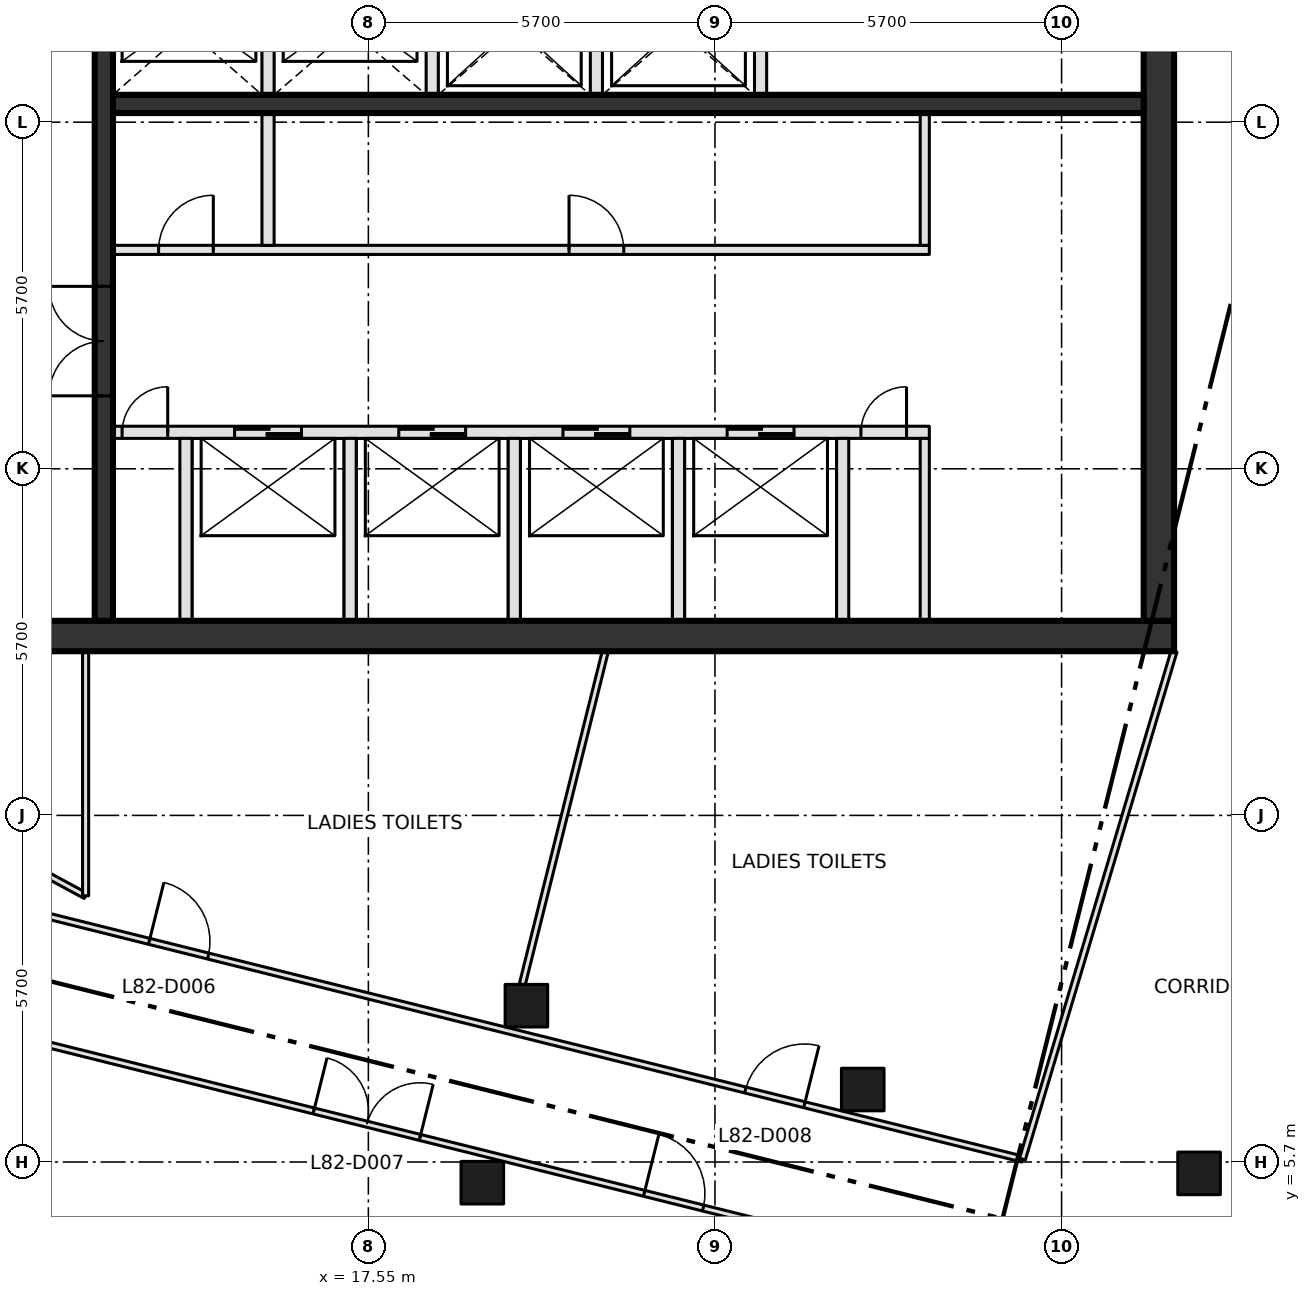
"""IFC4 building model, lengths in metres.
Left out: names, types, materials, properties, quantities, classifications, styles, units other than length and angle.
Written with IfcOpenShell. Run it as: python <this file> out.ifc"""

import sys

from ifc_helpers import new_model, si_unit, direction, frame, frame_2d, origin, origin_2d, place, context, subcontext, project, spatial, rectangle, extrude, element, fill, save


model = new_model("IFC4")
c1 = context("Model", 3, precision=1e-05, world=origin(), true_north=direction((0.0, 1.0)))
c2 = subcontext(c1, "Body", "Model", "MODEL_VIEW")
j1 = project(units=[si_unit("LENGTHUNIT", "METRE"), si_unit("PLANEANGLEUNIT", "RADIAN")], contexts=[c1])
p1 = place(None, origin())
s1 = spatial("IfcSite", under=j1, at=p1, CompositionType="ELEMENT")
p2 = place(p1, origin())
s2 = spatial("IfcBuilding", under=s1, at=p2, CompositionType="ELEMENT")
p3 = place(p2, frame((0.0, 0.0, 358.2)))
s3 = spatial("IfcBuildingStorey", under=s2, at=p3, CompositionType="ELEMENT", Elevation=358.2)
for number, where, z_axis, x_axis in (
    (1, (19.424, 5.36, 0.0), (0.0, 0.0, 1.0), (1.0, 0.0, 0.0)),
    (2, (20.149, 8.271, 0.0), (0.0, 0.0, 1.0), (1.0, 0.0, 0.0)),
    (3, (25.68, 6.892, 0.0), (0.0, 0.0, 1.0), (1.0, 0.0, 0.0)),
    (4, (31.211, 5.513, 0.0), (0.0, 0.0, 1.0), (1.0, 0.0, 0.0)),
):
    element("IfcColumn", number, at=place(p3, frame(where, z_axis=z_axis, x_axis=x_axis)), inside=s3, PredefinedType="COLUMN", context=c2, shape_type="SweptSolid", body=[
        extrude(rectangle(XDim=0.7, YDim=0.7, at=origin_2d()), origin(), (0.0, 0.0, 1.0), 4.2),
    ])
p4 = place(p3, frame((8.0, 14.35, -0.3), z_axis=(0.0, 0.0, 1.0), x_axis=(1.0, 0.0, 0.0)))
e5 = element("IfcWall", 5, at=p4, inside=s3, PredefinedType="SHEAR", context=c2, shape_type="SweptSolid", body=[
    extrude(rectangle(XDim=22.8, YDim=0.5, at=frame_2d((11.4, 0.0))), origin(), (0.0, 0.0, 1.0), 4.2),
])
p5 = place(p4, frame((2.3, 0.0, 0.3)))
e6 = element("IfcOpeningElement", 6, at=p5, cuts=e5, PredefinedType="OPENING", context=c2, shape_type="SweptSolid", body=[
    extrude(rectangle(XDim=1.8, YDim=2.1, at=frame_2d((0.9, 1.05))), frame((0.0, 0.26, 0.0), z_axis=(0.0, -1.0, 0.0), x_axis=(1.0, 0.0, 0.0)), (0.0, 0.0, 1.0), 0.52),
])
p6 = place(p3, frame((30.55, 14.6, -0.3), z_axis=(0.0, 0.0, 1.0), x_axis=(0.0, 1.0, 0.0)))
e7 = element("IfcWall", 7, at=p6, inside=s3, PredefinedType="SHEAR", context=c2, shape_type="SweptSolid", body=[
    extrude(rectangle(XDim=21.1, YDim=0.5, at=frame_2d((10.55, 0.0))), origin(), (0.0, 0.0, 1.0), 4.2),
])
p7 = place(p3, frame((13.35, 17.7, 0.0), z_axis=(0.0, 0.0, 1.0), x_axis=(1.0, 0.0, 0.0)))
e8 = element("IfcWall", 8, at=p7, inside=s3, PredefinedType="SOLIDWALL", context=c2, shape_type="SweptSolid", body=[
    extrude(rectangle(XDim=13.425, YDim=0.2, at=frame_2d((6.712, 0.0))), origin(), (0.0, 0.0, 1.0), 3.9),
])
p8 = place(p7, frame((2.0, 0.0, 0.0)))
e9 = element("IfcOpeningElement", 9, at=p8, cuts=e8, PredefinedType="OPENING", context=c2, shape_type="SweptSolid", body=[
    extrude(rectangle(XDim=1.1, YDim=2.1, at=frame_2d((0.55, 1.05))), frame((0.0, 0.11, 0.0), z_axis=(0.0, -1.0, 0.0), x_axis=(1.0, 0.0, 0.0)), (0.0, 0.0, 1.0), 0.22),
])
p9 = place(p7, frame((4.7, 0.0, 0.0)))
e10 = element("IfcOpeningElement", 10, at=p9, cuts=e8, PredefinedType="OPENING", context=c2, shape_type="SweptSolid", body=[
    extrude(rectangle(XDim=1.1, YDim=2.1, at=frame_2d((0.55, 1.05))), frame((0.0, 0.11, 0.0), z_axis=(0.0, -1.0, 0.0), x_axis=(1.0, 0.0, 0.0)), (0.0, 0.0, 1.0), 0.22),
])
p10 = place(p7, frame((7.4, 0.0, 0.0)))
e11 = element("IfcOpeningElement", 11, at=p10, cuts=e8, PredefinedType="OPENING", context=c2, shape_type="SweptSolid", body=[
    extrude(rectangle(XDim=1.1, YDim=2.1, at=frame_2d((0.55, 1.05))), frame((0.0, 0.11, 0.0), z_axis=(0.0, -1.0, 0.0), x_axis=(1.0, 0.0, 0.0)), (0.0, 0.0, 1.0), 0.22),
])
p11 = place(p7, frame((10.1, 0.0, 0.0)))
e12 = element("IfcOpeningElement", 12, at=p11, cuts=e8, PredefinedType="OPENING", context=c2, shape_type="SweptSolid", body=[
    extrude(rectangle(XDim=1.1, YDim=2.1, at=frame_2d((0.55, 1.05))), frame((0.0, 0.11, 0.0), z_axis=(0.0, -1.0, 0.0), x_axis=(1.0, 0.0, 0.0)), (0.0, 0.0, 1.0), 0.22),
])
p12 = place(p7, frame((0.15, 0.0, 0.0)))
e13 = element("IfcOpeningElement", 13, at=p12, cuts=e8, PredefinedType="OPENING", context=c2, shape_type="SweptSolid", body=[
    extrude(rectangle(XDim=0.75, YDim=2.1, at=frame_2d((0.375, 1.05))), frame((0.0, 0.11, 0.0), z_axis=(0.0, -1.0, 0.0), x_axis=(1.0, 0.0, 0.0)), (0.0, 0.0, 1.0), 0.22),
])
p13 = place(p7, frame((12.3, 0.0, 0.0)))
e14 = element("IfcOpeningElement", 14, at=p13, cuts=e8, PredefinedType="OPENING", context=c2, shape_type="SweptSolid", body=[
    extrude(rectangle(XDim=0.75, YDim=2.1, at=frame_2d((0.375, 1.05))), frame((0.0, 0.11, 0.0), z_axis=(0.0, -1.0, 0.0), x_axis=(1.0, 0.0, 0.0)), (0.0, 0.0, 1.0), 0.22),
])
p14 = place(p3, frame((13.35, 20.7, 0.0), z_axis=(0.0, 0.0, 1.0), x_axis=(1.0, 0.0, 0.0)))
e15 = element("IfcWall", 15, at=p14, inside=s3, PredefinedType="PARTITIONING", context=c2, shape_type="SweptSolid", body=[
    extrude(rectangle(XDim=13.425, YDim=0.15, at=frame_2d((6.712, 0.0))), origin(), (0.0, 0.0, 1.0), 3.9),
])
p15 = place(p14, frame((0.75, 0.0, 0.0)))
e16 = element("IfcOpeningElement", 16, at=p15, cuts=e15, PredefinedType="OPENING", context=c2, shape_type="SweptSolid", body=[
    extrude(rectangle(XDim=0.9, YDim=2.1, at=frame_2d((0.45, 1.05))), frame((0.0, 0.085, 0.0), z_axis=(0.0, -1.0, 0.0), x_axis=(1.0, 0.0, 0.0)), (0.0, 0.0, 1.0), 0.17),
])
p16 = place(p14, frame((7.5, 0.0, 0.0)))
e17 = element("IfcOpeningElement", 17, at=p16, cuts=e15, PredefinedType="OPENING", context=c2, shape_type="SweptSolid", body=[
    extrude(rectangle(XDim=0.9, YDim=2.1, at=frame_2d((0.45, 1.05))), frame((0.0, 0.085, 0.0), z_axis=(0.0, -1.0, 0.0), x_axis=(1.0, 0.0, 0.0)), (0.0, 0.0, 1.0), 0.17),
])
p17 = place(p3, frame((13.35, 23.1, 0.0), z_axis=(0.0, 0.0, 1.0), x_axis=(1.0, 0.0, 0.0)))
e18 = element("IfcWall", 18, at=p17, inside=s3, PredefinedType="SHEAR", context=c2, shape_type="SweptSolid", body=[
    extrude(rectangle(XDim=16.95, YDim=0.3, at=frame_2d((8.475, 0.0))), origin(), (0.0, 0.0, 1.0), 3.9),
])
p18 = place(p3, frame((13.2, 14.6, 0.0), z_axis=(0.0, 0.0, 1.0), x_axis=(0.0, 1.0, 0.0)))
e19 = element("IfcWall", 19, at=p18, inside=s3, PredefinedType="SHEAR", context=c2, shape_type="SweptSolid", body=[
    extrude(rectangle(XDim=21.1, YDim=0.3, at=frame_2d((10.55, 0.0))), origin(), (0.0, 0.0, 1.0), 3.9),
])
p19 = place(p18, frame((3.7, 0.0, 0.0)))
e20 = element("IfcOpeningElement", 20, at=p19, cuts=e19, PredefinedType="OPENING", context=c2, shape_type="SweptSolid", body=[
    extrude(rectangle(XDim=1.8, YDim=2.1, at=frame_2d((0.9, 1.05))), frame((0.0, 0.16, 0.0), z_axis=(0.0, -1.0, 0.0), x_axis=(1.0, 0.0, 0.0)), (0.0, 0.0, 1.0), 0.32),
])
p20 = place(p18, frame((11.8, 0.0, 0.0)))
e21 = element("IfcOpeningElement", 21, at=p20, cuts=e19, PredefinedType="OPENING", context=c2, shape_type="SweptSolid", body=[
    extrude(rectangle(XDim=1.2, YDim=2.1, at=frame_2d((0.6, 1.05))), frame((0.0, 0.16, 0.0), z_axis=(0.0, -1.0, 0.0), x_axis=(1.0, 0.0, 0.0)), (0.0, 0.0, 1.0), 0.32),
])
p21 = place(p3, frame((14.55, 14.6, 0.0), z_axis=(0.0, 0.0, 1.0), x_axis=(0.0, 1.0, 0.0)))
e22 = element("IfcWall", 22, at=p21, inside=s3, PredefinedType="SOLIDWALL", context=c2, shape_type="SweptSolid", body=[
    extrude(rectangle(XDim=3.0, YDim=0.2, at=frame_2d((1.5, 0.0))), origin(), (0.0, 0.0, 1.0), 3.9),
])
p22 = place(p3, frame((15.9, 20.775, 0.0), z_axis=(0.0, 0.0, 1.0), x_axis=(0.0, 1.0, 0.0)))
e23 = element("IfcWall", 23, at=p22, inside=s3, PredefinedType="SOLIDWALL", context=c2, shape_type="SweptSolid", body=[
    extrude(rectangle(XDim=4.625, YDim=0.2, at=frame_2d((2.312, 0.0))), origin(), (0.0, 0.0, 1.0), 3.9),
])
p23 = place(p3, frame((17.25, 14.6, 0.0), z_axis=(0.0, 0.0, 1.0), x_axis=(0.0, 1.0, 0.0)))
e24 = element("IfcWall", 24, at=p23, inside=s3, PredefinedType="SOLIDWALL", context=c2, shape_type="SweptSolid", body=[
    extrude(rectangle(XDim=3.0, YDim=0.2, at=frame_2d((1.5, 0.0))), origin(), (0.0, 0.0, 1.0), 3.9),
])
p24 = place(p3, frame((18.6, 23.25, 0.0), z_axis=(0.0, 0.0, 1.0), x_axis=(0.0, 1.0, 0.0)))
e25 = element("IfcWall", 25, at=p24, inside=s3, PredefinedType="SOLIDWALL", context=c2, shape_type="SweptSolid", body=[
    extrude(rectangle(XDim=5.15, YDim=0.2, at=frame_2d((2.575, 0.0))), origin(), (0.0, 0.0, 1.0), 3.9),
])
p25 = place(p24, frame((3.15, 0.0, 0.0)))
e26 = element("IfcOpeningElement", 26, at=p25, cuts=e25, PredefinedType="OPENING", context=c2, shape_type="SweptSolid", body=[
    extrude(rectangle(XDim=1.2, YDim=2.1, at=frame_2d((0.6, 1.05))), frame((0.0, 0.11, 0.0), z_axis=(0.0, -1.0, 0.0), x_axis=(1.0, 0.0, 0.0)), (0.0, 0.0, 1.0), 0.22),
])
p26 = place(p3, frame((19.95, 14.6, 0.0), z_axis=(0.0, 0.0, 1.0), x_axis=(0.0, 1.0, 0.0)))
e27 = element("IfcWall", 27, at=p26, inside=s3, PredefinedType="SOLIDWALL", context=c2, shape_type="SweptSolid", body=[
    extrude(rectangle(XDim=3.0, YDim=0.2, at=frame_2d((1.5, 0.0))), origin(), (0.0, 0.0, 1.0), 3.9),
])
p27 = place(p3, frame((21.3, 23.25, 0.0), z_axis=(0.0, 0.0, 1.0), x_axis=(0.0, 1.0, 0.0)))
e28 = element("IfcWall", 28, at=p27, inside=s3, PredefinedType="SOLIDWALL", context=c2, shape_type="SweptSolid", body=[
    extrude(rectangle(XDim=2.15, YDim=0.2, at=frame_2d((1.075, 0.0))), origin(), (0.0, 0.0, 1.0), 3.9),
])
p28 = place(p3, frame((22.65, 14.6, 0.0), z_axis=(0.0, 0.0, 1.0), x_axis=(0.0, 1.0, 0.0)))
e29 = element("IfcWall", 29, at=p28, inside=s3, PredefinedType="SOLIDWALL", context=c2, shape_type="SweptSolid", body=[
    extrude(rectangle(XDim=3.0, YDim=0.2, at=frame_2d((1.5, 0.0))), origin(), (0.0, 0.0, 1.0), 3.9),
])
p29 = place(p3, frame((24.0, 23.25, 0.0), z_axis=(0.0, 0.0, 1.0), x_axis=(0.0, 1.0, 0.0)))
e30 = element("IfcWall", 30, at=p29, inside=s3, PredefinedType="SOLIDWALL", context=c2, shape_type="SweptSolid", body=[
    extrude(rectangle(XDim=2.15, YDim=0.2, at=frame_2d((1.075, 0.0))), origin(), (0.0, 0.0, 1.0), 3.9),
])
p30 = place(p3, frame((25.35, 14.6, 0.0), z_axis=(0.0, 0.0, 1.0), x_axis=(0.0, 1.0, 0.0)))
e31 = element("IfcWall", 31, at=p30, inside=s3, PredefinedType="SOLIDWALL", context=c2, shape_type="SweptSolid", body=[
    extrude(rectangle(XDim=3.0, YDim=0.2, at=frame_2d((1.5, 0.0))), origin(), (0.0, 0.0, 1.0), 3.9),
])
p31 = place(p3, frame((26.7, 14.6, 0.0), z_axis=(0.0, 0.0, 1.0), x_axis=(0.0, 1.0, 0.0)))
e32 = element("IfcWall", 32, at=p31, inside=s3, PredefinedType="PARTITIONING", context=c2, shape_type="SweptSolid", body=[
    extrude(rectangle(XDim=3.0, YDim=0.15, at=frame_2d((1.5, 0.0))), origin(), (0.0, 0.0, 1.0), 3.9),
])
p32 = place(p3, frame((26.7, 20.775, 0.0), z_axis=(0.0, 0.0, 1.0), x_axis=(0.0, 1.0, 0.0)))
e33 = element("IfcWall", 33, at=p32, inside=s3, PredefinedType="PARTITIONING", context=c2, shape_type="SweptSolid", body=[
    extrude(rectangle(XDim=2.175, YDim=0.15, at=frame_2d((1.087, 0.0))), origin(), (0.0, 0.0, 1.0), 3.9),
])
p33 = place(p3, frame((8.521, 8.567, 0.0), z_axis=(0.0, 0.0, 1.0), x_axis=(0.970303035129, -0.241892579506, 0.0)))
e34 = element("IfcWall", 34, at=p33, inside=s3, PredefinedType="PARTITIONING", context=c2, shape_type="SweptSolid", body=[
    extrude(rectangle(XDim=28.5, YDim=0.1, at=frame_2d((14.25, 0.0))), origin(), (0.0, 0.0, 1.0), 3.9),
])
p34 = place(p33, frame((13.98, 0.0, 0.0)))
e35 = element("IfcOpeningElement", 35, at=p34, cuts=e34, PredefinedType="OPENING", context=c2, shape_type="SweptSolid", body=[
    extrude(rectangle(XDim=1.0, YDim=2.1, at=frame_2d((0.5, 1.05))), frame((0.0, 0.06, 0.0), z_axis=(0.0, -1.0, 0.0), x_axis=(1.0, 0.0, 0.0)), (0.0, 0.0, 1.0), 0.12),
])
p35 = place(p33, frame((8.38, 0.0, 0.0)))
e36 = element("IfcOpeningElement", 36, at=p35, cuts=e34, PredefinedType="OPENING", context=c2, shape_type="SweptSolid", body=[
    extrude(rectangle(XDim=1.8, YDim=2.1, at=frame_2d((0.9, 1.05))), frame((0.0, 0.06, 0.0), z_axis=(0.0, -1.0, 0.0), x_axis=(1.0, 0.0, 0.0)), (0.0, 0.0, 1.0), 0.12),
])
p36 = place(p3, frame((9.017, 10.558, 0.0), z_axis=(0.0, 0.0, 1.0), x_axis=(0.970286089829, -0.241960542, 0.0)))
e37 = element("IfcWall", 37, at=p36, inside=s3, PredefinedType="PARTITIONING", context=c2, shape_type="SweptSolid", body=[
    extrude(rectangle(XDim=19.879, YDim=0.1, at=frame_2d((9.94, 0.0))), origin(), (0.0, 0.0, 1.0), 3.9),
])
p37 = place(p36, frame((5.08, 0.0, 0.0)))
e38 = element("IfcOpeningElement", 38, at=p37, cuts=e37, PredefinedType="OPENING", context=c2, shape_type="SweptSolid", body=[
    extrude(rectangle(XDim=1.0, YDim=2.1, at=frame_2d((0.5, 1.05))), frame((0.0, 0.06, 0.0), z_axis=(0.0, -1.0, 0.0), x_axis=(1.0, 0.0, 0.0)), (0.0, 0.0, 1.0), 0.12),
])
p38 = place(p36, frame((15.184, 0.0, 0.0)))
e39 = element("IfcOpeningElement", 39, at=p38, cuts=e37, PredefinedType="OPENING", context=c2, shape_type="SweptSolid", body=[
    extrude(rectangle(XDim=1.0, YDim=2.1, at=frame_2d((0.5, 1.05))), frame((0.0, 0.06, 0.0), z_axis=(0.0, -1.0, 0.0), x_axis=(1.0, 0.0, 0.0)), (0.0, 0.0, 1.0), 0.12),
])
p39 = place(p3, frame((9.9, 11.7, 0.0), z_axis=(0.0, 0.0, 1.0), x_axis=(0.87965147249, -0.475618846291, 0.0)))
e40 = element("IfcWall", 40, at=p39, inside=s3, PredefinedType="PARTITIONING", context=c2, shape_type="SweptSolid", body=[
    extrude(rectangle(XDim=3.41, YDim=0.1, at=frame_2d((1.705, 0.0))), origin(), (0.0, 0.0, 1.0), 3.9),
])
p40 = place(p3, frame((12.9, 10.078, 0.0), z_axis=(0.0, 0.0, 1.0), x_axis=(0.0, 1.0, 0.0)))
e41 = element("IfcWall", 41, at=p40, inside=s3, PredefinedType="PARTITIONING", context=c2, shape_type="SweptSolid", body=[
    extrude(rectangle(XDim=4.022, YDim=0.1, at=frame_2d((2.011, 0.0))), origin(), (0.0, 0.0, 1.0), 3.9),
])
p41 = place(p3, frame((30.8, 14.1, 0.0), z_axis=(0.0, 0.0, 1.0), x_axis=(-0.286139929679, -0.958187842045, 0.0)))
e42 = element("IfcWall", 42, at=p41, inside=s3, PredefinedType="PARTITIONING", context=c2, shape_type="SweptSolid", body=[
    extrude(rectangle(XDim=8.717, YDim=0.1, at=frame_2d((4.358, 0.0))), origin(), (0.0, 0.0, 1.0), 3.9),
])
p42 = place(p3, frame((20.081, 8.621, 0.0), z_axis=(0.0, 0.0, 1.0), x_axis=(0.241904838353, 0.970299978966, 0.0)))
e43 = element("IfcWall", 43, at=p42, inside=s3, PredefinedType="PARTITIONING", context=c2, shape_type="SweptSolid", body=[
    extrude(rectangle(XDim=5.647, YDim=0.1, at=frame_2d((2.823, 0.0))), origin(), (0.0, 0.0, 1.0), 3.9),
])
p43 = place(p8, origin())
e44 = element("IfcDoor", 44, at=p43, inside=s3, OperationType="SLIDING_TO_LEFT", PredefinedType="DOOR", context=c2, shape_type="SweptSolid", body=[
    extrude(rectangle(XDim=1.1, YDim=2.1, at=frame_2d((0.55, 1.05))), frame((0.0, 0.025, 0.0), z_axis=(0.0, -1.0, 0.0), x_axis=(1.0, 0.0, 0.0)), (0.0, 0.0, 1.0), 0.05),
])
fill(e9, e44)
p44 = place(p9, origin())
e45 = element("IfcDoor", 45, at=p44, inside=s3, OperationType="SLIDING_TO_LEFT", PredefinedType="DOOR", context=c2, shape_type="SweptSolid", body=[
    extrude(rectangle(XDim=1.1, YDim=2.1, at=frame_2d((0.55, 1.05))), frame((0.0, 0.025, 0.0), z_axis=(0.0, -1.0, 0.0), x_axis=(1.0, 0.0, 0.0)), (0.0, 0.0, 1.0), 0.05),
])
fill(e10, e45)
p45 = place(p10, origin())
e46 = element("IfcDoor", 46, at=p45, inside=s3, OperationType="SLIDING_TO_LEFT", PredefinedType="DOOR", context=c2, shape_type="SweptSolid", body=[
    extrude(rectangle(XDim=1.1, YDim=2.1, at=frame_2d((0.55, 1.05))), frame((0.0, 0.025, 0.0), z_axis=(0.0, -1.0, 0.0), x_axis=(1.0, 0.0, 0.0)), (0.0, 0.0, 1.0), 0.05),
])
fill(e11, e46)
p46 = place(p11, origin())
e47 = element("IfcDoor", 47, at=p46, inside=s3, OperationType="SLIDING_TO_LEFT", PredefinedType="DOOR", context=c2, shape_type="SweptSolid", body=[
    extrude(rectangle(XDim=1.1, YDim=2.1, at=frame_2d((0.55, 1.05))), frame((0.0, 0.025, 0.0), z_axis=(0.0, -1.0, 0.0), x_axis=(1.0, 0.0, 0.0)), (0.0, 0.0, 1.0), 0.05),
])
fill(e12, e47)
p47 = place(p12, origin())
e48 = element("IfcDoor", 48, at=p47, inside=s3, OperationType="SINGLE_SWING_RIGHT", PredefinedType="DOOR", context=c2, shape_type="SweptSolid", body=[
    extrude(rectangle(XDim=0.75, YDim=2.1, at=frame_2d((0.375, 1.05))), frame((0.0, 0.025, 0.0), z_axis=(0.0, -1.0, 0.0), x_axis=(1.0, 0.0, 0.0)), (0.0, 0.0, 1.0), 0.05),
])
fill(e13, e48)
p48 = place(p13, origin())
e49 = element("IfcDoor", 49, at=p48, inside=s3, OperationType="SINGLE_SWING_RIGHT", PredefinedType="DOOR", context=c2, shape_type="SweptSolid", body=[
    extrude(rectangle(XDim=0.75, YDim=2.1, at=frame_2d((0.375, 1.05))), frame((0.0, 0.025, 0.0), z_axis=(0.0, -1.0, 0.0), x_axis=(1.0, 0.0, 0.0)), (0.0, 0.0, 1.0), 0.05),
])
fill(e14, e49)
p49 = place(p15, origin())
e50 = element("IfcDoor", 50, at=p49, inside=s3, OperationType="SINGLE_SWING_RIGHT", PredefinedType="DOOR", context=c2, shape_type="SweptSolid", body=[
    extrude(rectangle(XDim=0.9, YDim=2.1, at=frame_2d((0.45, 1.05))), frame((0.0, 0.025, 0.0), z_axis=(0.0, -1.0, 0.0), x_axis=(1.0, 0.0, 0.0)), (0.0, 0.0, 1.0), 0.05),
])
fill(e16, e50)
p50 = place(p16, origin())
e51 = element("IfcDoor", 51, at=p50, inside=s3, OperationType="SINGLE_SWING_LEFT", PredefinedType="DOOR", context=c2, shape_type="SweptSolid", body=[
    extrude(rectangle(XDim=0.9, YDim=2.1, at=frame_2d((0.45, 1.05))), frame((0.0, 0.025, 0.0), z_axis=(0.0, -1.0, 0.0), x_axis=(1.0, 0.0, 0.0)), (0.0, 0.0, 1.0), 0.05),
])
fill(e17, e51)
p51 = place(p19, origin())
e52 = element("IfcDoor", 52, at=p51, inside=s3, OperationType="DOUBLE_DOOR_SINGLE_SWING", PredefinedType="DOOR", context=c2, shape_type="SweptSolid", body=[
    extrude(rectangle(XDim=1.8, YDim=2.1, at=frame_2d((0.9, 1.05))), frame((0.0, 0.025, 0.0), z_axis=(0.0, -1.0, 0.0), x_axis=(1.0, 0.0, 0.0)), (0.0, 0.0, 1.0), 0.05),
])
fill(e20, e52)
p52 = place(p34, origin())
e53 = element("IfcDoor", 53, at=p52, inside=s3, OperationType="SINGLE_SWING_LEFT", PredefinedType="DOOR", context=c2, shape_type="SweptSolid", body=[
    extrude(rectangle(XDim=1.0, YDim=2.1, at=frame_2d((0.5, 1.05))), frame((0.0, 0.025, 0.0), z_axis=(0.0, -1.0, 0.0), x_axis=(1.0, 0.0, 0.0)), (0.0, 0.0, 1.0), 0.05),
])
fill(e35, e53)
p53 = place(p37, origin())
e54 = element("IfcDoor", 54, at=p53, inside=s3, OperationType="SINGLE_SWING_LEFT", PredefinedType="DOOR", context=c2, shape_type="SweptSolid", body=[
    extrude(rectangle(XDim=1.0, YDim=2.1, at=frame_2d((0.5, 1.05))), frame((0.0, 0.025, 0.0), z_axis=(0.0, -1.0, 0.0), x_axis=(1.0, 0.0, 0.0)), (0.0, 0.0, 1.0), 0.05),
])
fill(e38, e54)
p54 = place(p35, origin())
e55 = element("IfcDoor", 55, at=p54, inside=s3, OperationType="DOUBLE_DOOR_SINGLE_SWING", PredefinedType="DOOR", context=c2, shape_type="SweptSolid", body=[
    extrude(rectangle(XDim=1.8, YDim=2.1, at=frame_2d((0.9, 1.05))), frame((0.0, 0.025, 0.0), z_axis=(0.0, -1.0, 0.0), x_axis=(1.0, 0.0, 0.0)), (0.0, 0.0, 1.0), 0.05),
])
fill(e36, e55)
p55 = place(p38, origin())
e56 = element("IfcDoor", 56, at=p55, inside=s3, OperationType="SINGLE_SWING_RIGHT", PredefinedType="DOOR", context=c2, shape_type="SweptSolid", body=[
    extrude(rectangle(XDim=1.0, YDim=2.1, at=frame_2d((0.5, 1.05))), frame((0.0, 0.025, 0.0), z_axis=(0.0, -1.0, 0.0), x_axis=(1.0, 0.0, 0.0)), (0.0, 0.0, 1.0), 0.05),
])
fill(e39, e56)
save(model, sys.argv[1])
